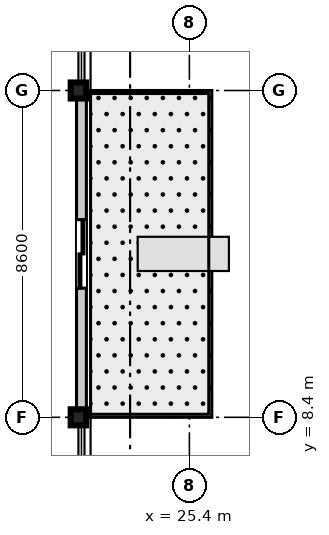
"""IFC4 building model, lengths in metres.
Left out: names, types, materials, properties, quantities, classifications, styles, units other than length and angle.
Written with IfcOpenShell. Run it as: python <this file> out.ifc"""

import sys

from ifc_helpers import new_model, si_unit, direction, frame, frame_2d, origin, origin_2d, place, context, subcontext, project, spatial, rectangle, i_section, extrude, source, transform, mapped, element, fill, save


model = new_model("IFC4")
c1 = context("Model", 3, precision=1e-05, world=origin(), true_north=direction((0.0, 1.0)))
c2 = subcontext(c1, "Body", "Model", "MODEL_VIEW")
j1 = project(units=[si_unit("LENGTHUNIT", "METRE"), si_unit("PLANEANGLEUNIT", "RADIAN")], contexts=[c1])
p1 = place(None, origin())
s1 = spatial("IfcSite", under=j1, at=p1, CompositionType="ELEMENT")
p2 = place(p1, origin())
s2 = spatial("IfcBuilding", under=s1, at=p2, CompositionType="ELEMENT")
p3 = place(p2, frame((0.0, 0.0, 192.8)))
s3 = spatial("IfcBuildingStorey", under=s2, at=p3, CompositionType="ELEMENT", Elevation=192.8)
m1 = source(origin(), c2, "Body", "SweptSolid", [
    extrude(i_section(OverallWidth=0.406, OverallDepth=0.422, WebThickness=0.019, FlangeThickness=0.03, at=origin_2d()), origin(), (0.0, 0.0, 1.0), 3.605),
])
for number, where, z_axis, x_axis in (
    (1, (22.48, 8.4, 0.0), (0.0, 0.0, 1.0), (1.0, 0.0, 0.0)),
    (2, (22.48, 17.0, 0.0), (0.0, 0.0, 1.0), (1.0, 0.0, 0.0)),
):
    element("IfcColumn", number, at=place(p3, frame(where, z_axis=z_axis, x_axis=x_axis)), inside=s3, PredefinedType="COLUMN", context=c2, shape_type="MappedRepresentation", body=[
        mapped(m1, transform((0.0, 0.0, 0.0), scale=1.0)),
    ])
m2 = source(origin(), c2, "Body", "SweptSolid", [
    extrude(rectangle(XDim=8.6, YDim=0.26, at=frame_2d((4.3, 0.0))), origin(), (0.0, 0.0, 1.0), 2.87),
])
p4 = place(p3, frame((22.56, 8.4, 0.0), z_axis=(0.0, 0.0, 1.0), x_axis=(0.0, 1.0, 0.0)))
e3 = element("IfcWall", 3, at=p4, inside=s3, PredefinedType="STANDARD", context=c2, shape_type="MappedRepresentation", body=[
    mapped(m2, transform((0.0, 0.0, 0.0), scale=1.0)),
])
p5 = place(p4, frame((3.4, 0.0, 0.0)))
e4 = element("IfcOpeningElement", 4, at=p5, cuts=e3, PredefinedType="OPENING", context=c2, shape_type="SweptSolid", body=[
    extrude(rectangle(XDim=1.8, YDim=2.25, at=frame_2d((0.9, 1.125))), frame((0.0, 0.14, 0.0), z_axis=(0.0, -1.0, 0.0), x_axis=(1.0, 0.0, 0.0)), (0.0, 0.0, 1.0), 0.28),
])
m3 = source(origin(), c2, "Body", "SweptSolid", [
    extrude(rectangle(XDim=1.8, YDim=2.25, at=frame_2d((0.9, 1.125))), frame((0.0, 0.025, 0.0), z_axis=(0.0, -1.0, 0.0), x_axis=(1.0, 0.0, 0.0)), (0.0, 0.0, 1.0), 0.05),
])
p6 = place(p5, frame((1.8, 0.0, 0.0), z_axis=(0.0, 0.0, 1.0), x_axis=(-1.0, 0.0, 0.0)))
e5 = element("IfcDoor", 5, at=p6, inside=s3, OperationType="DOUBLE_DOOR_SLIDING", PredefinedType="DOOR", context=c2, shape_type="MappedRepresentation", body=[
    mapped(m3, transform((0.0, 0.0, 0.0), scale=1.0)),
])
fill(e4, e5)
save(model, sys.argv[1])
